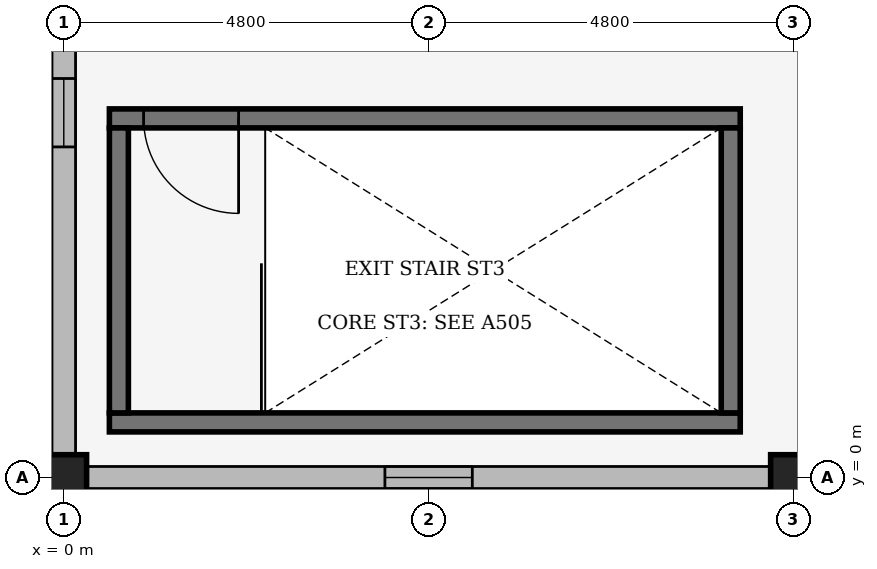
"""IFC4 building model, lengths in metres.
Left out: names, types, materials, properties, quantities, classifications, styles, units other than length and angle.
Written with IfcOpenShell. Run it as: python <this file> out.ifc"""

import sys

from ifc_helpers import new_model, si_unit, direction, frame, frame_2d, origin, origin_2d, place, context, subcontext, project, spatial, rectangle, extrude, element, fill, save


model = new_model("IFC4")
c1 = context("Model", 3, precision=1e-05, world=origin(), true_north=direction((0.0, 1.0)))
c2 = subcontext(c1, "Body", "Model", "MODEL_VIEW")
j1 = project(units=[si_unit("LENGTHUNIT", "METRE"), si_unit("PLANEANGLEUNIT", "RADIAN")], contexts=[c1])
p1 = place(None, origin())
s1 = spatial("IfcSite", under=j1, at=p1, CompositionType="ELEMENT")
p2 = place(p1, origin())
s2 = spatial("IfcBuilding", under=s1, at=p2, CompositionType="ELEMENT")
p3 = place(p2, frame((0.0, 0.0, 15.3)))
s3 = spatial("IfcBuildingStorey", under=s2, at=p3, CompositionType="ELEMENT", Elevation=15.3)
for number, where, z_axis, x_axis in (
    (1, (0.0, 0.0, 0.0), (0.0, 0.0, 1.0), (1.0, 0.0, 0.0)),
    (2, (9.6, 0.0, 0.0), (0.0, 0.0, 1.0), (1.0, 0.0, 0.0)),
):
    element("IfcColumn", number, at=place(p3, frame(where, z_axis=z_axis, x_axis=x_axis)), inside=s3, PredefinedType="COLUMN", context=c2, shape_type="SweptSolid", body=[
        extrude(rectangle(XDim=0.6, YDim=0.6, at=origin_2d()), origin(), (0.0, 0.0, 1.0), 4.5),
    ])
p4 = place(p3, frame((0.0, 9.292, 0.0), z_axis=(0.0, 0.0, 1.0), x_axis=(0.0, -1.0, 0.0)))
e3 = element("IfcWall", 3, at=p4, inside=s3, PredefinedType="SOLIDWALL", context=c2, shape_type="SweptSolid", body=[
    extrude(rectangle(XDim=8.984, YDim=0.31, at=frame_2d((4.492, 0.0))), origin(), (0.0, 0.0, 1.0), 4.103),
])
p5 = place(p4, frame((4.042, 0.0, 0.95)))
e4 = element("IfcOpeningElement", 4, at=p5, cuts=e3, PredefinedType="OPENING", context=c2, shape_type="SweptSolid", body=[
    extrude(rectangle(XDim=0.9, YDim=2.1, at=frame_2d((0.45, 1.05))), frame((0.0, 0.165, 0.0), z_axis=(0.0, -1.0, 0.0), x_axis=(1.0, 0.0, 0.0)), (0.0, 0.0, 1.0), 0.33),
])
p6 = place(p3, frame((0.308, 0.0, 0.0), z_axis=(0.0, 0.0, 1.0), x_axis=(1.0, 0.0, 0.0)))
e5 = element("IfcWall", 5, at=p6, inside=s3, PredefinedType="SOLIDWALL", context=c2, shape_type="SweptSolid", body=[
    extrude(rectangle(XDim=8.984, YDim=0.29, at=frame_2d((4.492, 0.0))), origin(), (0.0, 0.0, 1.0), 4.103),
])
p7 = place(p6, frame((3.917, 0.0, 0.95)))
e6 = element("IfcOpeningElement", 6, at=p7, cuts=e5, PredefinedType="OPENING", context=c2, shape_type="SweptSolid", body=[
    extrude(rectangle(XDim=1.15, YDim=1.2, at=frame_2d((0.575, 0.6))), frame((0.0, 0.155, 0.0), z_axis=(0.0, -1.0, 0.0), x_axis=(1.0, 0.0, 0.0)), (0.0, 0.0, 1.0), 0.31),
])
p8 = place(p3, frame((0.6, 0.725, 0.0), z_axis=(0.0, 0.0, 1.0), x_axis=(1.0, 0.0, 0.0)))
e7 = element("IfcWall", 7, at=p8, inside=s3, PredefinedType="SHEAR", context=c2, shape_type="SweptSolid", body=[
    extrude(rectangle(XDim=8.3, YDim=0.25, at=frame_2d((4.15, 0.0))), origin(), (0.0, 0.0, 1.0), 4.5),
])
p9 = place(p3, frame((8.9, 4.725, 0.0), z_axis=(0.0, 0.0, 1.0), x_axis=(-1.0, 0.0, 0.0)))
e8 = element("IfcWall", 8, at=p9, inside=s3, PredefinedType="SHEAR", context=c2, shape_type="SweptSolid", body=[
    extrude(rectangle(XDim=8.3, YDim=0.25, at=frame_2d((4.15, 0.0))), origin(), (0.0, 0.0, 1.0), 4.5),
])
p10 = place(p9, frame((7.85, 0.0, 0.0), z_axis=(0.0, 0.0, 1.0), x_axis=(-1.0, 0.0, 0.0)))
e9 = element("IfcOpeningElement", 9, at=p10, cuts=e8, PredefinedType="OPENING", context=c2, shape_type="SweptSolid", body=[
    extrude(rectangle(XDim=1.25, YDim=2.2, at=frame_2d((0.625, 1.1))), frame((0.0, 0.135, 0.0), z_axis=(0.0, -1.0, 0.0), x_axis=(1.0, 0.0, 0.0)), (0.0, 0.0, 1.0), 0.27),
])
for number, where, z_axis, x_axis in (
    (10, (0.725, 4.6, 0.0), (0.0, 0.0, 1.0), (0.0, -1.0, 0.0)),
    (11, (8.775, 0.85, 0.0), (0.0, 0.0, 1.0), (0.0, 1.0, 0.0)),
):
    element("IfcWall", number, at=place(p3, frame(where, z_axis=z_axis, x_axis=x_axis)), inside=s3, PredefinedType="SHEAR", context=c2, shape_type="SweptSolid", body=[
        extrude(rectangle(XDim=3.75, YDim=0.25, at=frame_2d((1.875, 0.0))), origin(), (0.0, 0.0, 1.0), 4.5),
    ])
p11 = place(p5, origin())
e12 = element("IfcWindow", 12, at=p11, inside=s3, PartitioningType="SINGLE_PANEL", PredefinedType="WINDOW", context=c2, shape_type="SweptSolid", body=[
    extrude(rectangle(XDim=0.9, YDim=2.1, at=frame_2d((0.45, 1.05))), frame((0.0, 0.03, 0.0), z_axis=(0.0, -1.0, 0.0), x_axis=(1.0, 0.0, 0.0)), (0.0, 0.0, 1.0), 0.06),
])
fill(e4, e12)
p12 = place(p7, origin())
e13 = element("IfcWindow", 13, at=p12, inside=s3, PartitioningType="SINGLE_PANEL", PredefinedType="WINDOW", context=c2, shape_type="SweptSolid", body=[
    extrude(rectangle(XDim=1.15, YDim=1.2, at=frame_2d((0.575, 0.6))), frame((0.0, 0.03, 0.0), z_axis=(0.0, -1.0, 0.0), x_axis=(1.0, 0.0, 0.0)), (0.0, 0.0, 1.0), 0.06),
])
fill(e6, e13)
p13 = place(p10, origin())
e14 = element("IfcDoor", 14, at=p13, inside=s3, OperationType="SINGLE_SWING_RIGHT", PredefinedType="DOOR", context=c2, shape_type="SweptSolid", body=[
    extrude(rectangle(XDim=1.25, YDim=2.2, at=frame_2d((0.625, 1.1))), frame((0.0, 0.025, 0.0), z_axis=(0.0, -1.0, 0.0), x_axis=(1.0, 0.0, 0.0)), (0.0, 0.0, 1.0), 0.05),
])
fill(e9, e14)
save(model, sys.argv[1])
